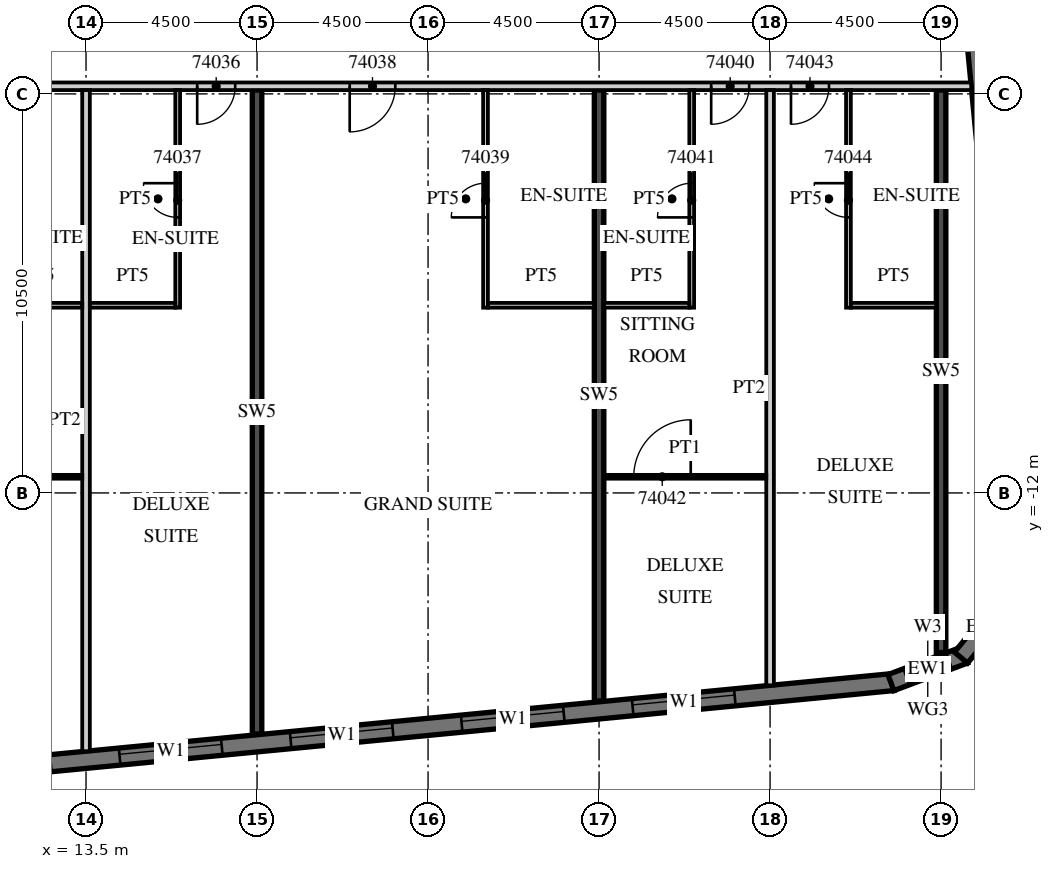
"""IFC4 building model, lengths in metres.
Left out: names, types, materials, properties, quantities, classifications, styles, units other than length and angle.
Written with IfcOpenShell. Run it as: python <this file> out.ifc"""

import sys

from ifc_helpers import new_model, si_unit, direction, frame, frame_2d, origin, place, context, subcontext, project, spatial, polyline, rectangle, outline, extrude, element, fill, save


model = new_model("IFC4")
c1 = context("Model", 3, precision=1e-05, world=origin(), true_north=direction((0.0, 1.0)))
c2 = subcontext(c1, "Body", "Model", "MODEL_VIEW")
j1 = project(units=[si_unit("LENGTHUNIT", "METRE"), si_unit("PLANEANGLEUNIT", "RADIAN")], contexts=[c1])
p1 = place(None, origin())
s1 = spatial("IfcSite", under=j1, at=p1, CompositionType="ELEMENT")
p2 = place(p1, origin())
s2 = spatial("IfcBuilding", under=s1, at=p2, CompositionType="ELEMENT")
p3 = place(p2, frame((0.0, 0.0, 294.9)))
s3 = spatial("IfcBuildingStorey", under=s2, at=p3, CompositionType="ELEMENT", Elevation=294.9)
p4 = place(p3, frame((18.0, -18.341, 0.0), z_axis=(0.0, 0.0, 1.0), x_axis=(0.0, 1.0, 0.0)))
e1 = element("IfcWall", 1, at=p4, inside=s3, PredefinedType="SHEAR", context=c2, shape_type="SweptSolid", body=[
    extrude(rectangle(XDim=16.941, YDim=0.25, at=frame_2d((8.47, 0.0))), origin(), (0.0, 0.0, 1.0), 3.3),
])
p5 = place(p3, frame((27.0, -17.474, 0.0), z_axis=(0.0, 0.0, 1.0), x_axis=(0.0, 1.0, 0.0)))
e2 = element("IfcWall", 2, at=p5, inside=s3, PredefinedType="SHEAR", context=c2, shape_type="SweptSolid", body=[
    extrude(rectangle(XDim=16.074, YDim=0.25, at=frame_2d((8.037, 0.0))), origin(), (0.0, 0.0, 1.0), 3.3),
])
p6 = place(p3, frame((36.0, -16.199, 0.0), z_axis=(0.0, 0.0, 1.0), x_axis=(0.0, 1.0, 0.0)))
e3 = element("IfcWall", 3, at=p6, inside=s3, PredefinedType="SHEAR", context=c2, shape_type="SweptSolid", body=[
    extrude(rectangle(XDim=14.799, YDim=0.25, at=frame_2d((7.399, 0.0))), origin(), (0.0, 0.0, 1.0), 3.3),
])
p7 = place(p3, frame((-13.521, -21.624, 0.0), z_axis=(0.0, 0.0, 1.0), x_axis=(0.995396186218, 0.095845878695, 0.0)))
e4 = element("IfcWall", 4, at=p7, inside=s3, PredefinedType="SOLIDWALL", context=c2, shape_type="SweptSolid", body=[
    extrude(rectangle(XDim=48.481, YDim=0.45, at=frame_2d((24.241, 0.0))), origin(), (0.0, 0.0, 1.0), 3.02),
])
p8 = place(p7, frame((0.91, 0.0, 0.45)))
e5 = element("IfcOpeningElement", 5, at=p8, cuts=e4, PredefinedType="OPENING", context=c2, shape_type="SweptSolid", body=[
    extrude(rectangle(XDim=2.7, YDim=2.25, at=frame_2d((1.35, 1.125))), frame((0.0, 0.235, 0.0), z_axis=(0.0, -1.0, 0.0), x_axis=(1.0, 0.0, 0.0)), (0.0, 0.0, 1.0), 0.47),
])
p9 = place(p7, frame((5.431, 0.0, 0.45)))
e6 = element("IfcOpeningElement", 6, at=p9, cuts=e4, PredefinedType="OPENING", context=c2, shape_type="SweptSolid", body=[
    extrude(rectangle(XDim=2.7, YDim=2.25, at=frame_2d((1.35, 1.125))), frame((0.0, 0.235, 0.0), z_axis=(0.0, -1.0, 0.0), x_axis=(1.0, 0.0, 0.0)), (0.0, 0.0, 1.0), 0.47),
])
p10 = place(p7, frame((9.952, 0.0, 0.45)))
e7 = element("IfcOpeningElement", 7, at=p10, cuts=e4, PredefinedType="OPENING", context=c2, shape_type="SweptSolid", body=[
    extrude(rectangle(XDim=2.7, YDim=2.25, at=frame_2d((1.35, 1.125))), frame((0.0, 0.235, 0.0), z_axis=(0.0, -1.0, 0.0), x_axis=(1.0, 0.0, 0.0)), (0.0, 0.0, 1.0), 0.47),
])
p11 = place(p7, frame((14.473, 0.0, 0.45)))
e8 = element("IfcOpeningElement", 8, at=p11, cuts=e4, PredefinedType="OPENING", context=c2, shape_type="SweptSolid", body=[
    extrude(rectangle(XDim=2.7, YDim=2.25, at=frame_2d((1.35, 1.125))), frame((0.0, 0.235, 0.0), z_axis=(0.0, -1.0, 0.0), x_axis=(1.0, 0.0, 0.0)), (0.0, 0.0, 1.0), 0.47),
])
p12 = place(p7, frame((18.994, 0.0, 0.45)))
e9 = element("IfcOpeningElement", 9, at=p12, cuts=e4, PredefinedType="OPENING", context=c2, shape_type="SweptSolid", body=[
    extrude(rectangle(XDim=2.7, YDim=2.25, at=frame_2d((1.35, 1.125))), frame((0.0, 0.235, 0.0), z_axis=(0.0, -1.0, 0.0), x_axis=(1.0, 0.0, 0.0)), (0.0, 0.0, 1.0), 0.47),
])
p13 = place(p7, frame((23.514, 0.0, 0.45)))
e10 = element("IfcOpeningElement", 10, at=p13, cuts=e4, PredefinedType="OPENING", context=c2, shape_type="SweptSolid", body=[
    extrude(rectangle(XDim=2.7, YDim=2.25, at=frame_2d((1.35, 1.125))), frame((0.0, 0.235, 0.0), z_axis=(0.0, -1.0, 0.0), x_axis=(1.0, 0.0, 0.0)), (0.0, 0.0, 1.0), 0.47),
])
p14 = place(p7, frame((28.035, 0.0, 0.45)))
e11 = element("IfcOpeningElement", 11, at=p14, cuts=e4, PredefinedType="OPENING", context=c2, shape_type="SweptSolid", body=[
    extrude(rectangle(XDim=2.7, YDim=2.25, at=frame_2d((1.35, 1.125))), frame((0.0, 0.235, 0.0), z_axis=(0.0, -1.0, 0.0), x_axis=(1.0, 0.0, 0.0)), (0.0, 0.0, 1.0), 0.47),
])
p15 = place(p7, frame((32.556, 0.0, 0.45)))
e12 = element("IfcOpeningElement", 12, at=p15, cuts=e4, PredefinedType="OPENING", context=c2, shape_type="SweptSolid", body=[
    extrude(rectangle(XDim=2.7, YDim=2.25, at=frame_2d((1.35, 1.125))), frame((0.0, 0.235, 0.0), z_axis=(0.0, -1.0, 0.0), x_axis=(1.0, 0.0, 0.0)), (0.0, 0.0, 1.0), 0.47),
])
p16 = place(p7, frame((37.077, 0.0, 0.45)))
e13 = element("IfcOpeningElement", 13, at=p16, cuts=e4, PredefinedType="OPENING", context=c2, shape_type="SweptSolid", body=[
    extrude(rectangle(XDim=2.7, YDim=2.25, at=frame_2d((1.35, 1.125))), frame((0.0, 0.235, 0.0), z_axis=(0.0, -1.0, 0.0), x_axis=(1.0, 0.0, 0.0)), (0.0, 0.0, 1.0), 0.47),
])
p17 = place(p7, frame((41.598, 0.0, 0.45)))
e14 = element("IfcOpeningElement", 14, at=p17, cuts=e4, PredefinedType="OPENING", context=c2, shape_type="SweptSolid", body=[
    extrude(rectangle(XDim=2.7, YDim=2.25, at=frame_2d((1.35, 1.125))), frame((0.0, 0.235, 0.0), z_axis=(0.0, -1.0, 0.0), x_axis=(1.0, 0.0, 0.0)), (0.0, 0.0, 1.0), 0.47),
])
p18 = place(p3, frame((34.679, -16.99, 0.0), z_axis=(0.0, 0.0, 1.0), x_axis=(0.936677599948, 0.350192909346, 0.0)))
e15 = element("IfcWall", 15, at=p18, inside=s3, PredefinedType="SOLIDWALL", context=c2, shape_type="SweptSolid", body=[
    extrude(outline(polyline([(0.0, -0.225), (2.071, -0.225), (1.95, 0.225), (0.121, 0.225), (0.0, -0.225)])), origin(), (0.0, 0.0, 1.0), 3.02),
])
p19 = place(p18, frame((0.435, 0.0, 0.45)))
e16 = element("IfcOpeningElement", 16, at=p19, cuts=e15, PredefinedType="OPENING", context=c2, shape_type="SweptSolid", body=[
    extrude(rectangle(XDim=1.2, YDim=2.25, at=frame_2d((0.6, 1.125))), frame((0.0, 0.235, 0.0), z_axis=(0.0, -1.0, 0.0), x_axis=(1.0, 0.0, 0.0)), (0.0, 0.0, 1.0), 0.47),
])
p20 = place(p3, frame((36.524, -16.333, 0.0), z_axis=(0.0, 0.0, 1.0), x_axis=(0.636046112757, 0.771651049663, 0.0)))
e17 = element("IfcWall", 17, at=p20, inside=s3, PredefinedType="SOLIDWALL", context=c2, shape_type="SweptSolid", body=[
    extrude(outline(polyline([(0.0, -0.225), (2.071, -0.225), (1.95, 0.225), (0.121, 0.225), (0.0, -0.225)])), origin(), (0.0, 0.0, 1.0), 3.02),
])
p21 = place(p3, frame((38.132, -12.858, 0.0), z_axis=(0.0, 0.0, 1.0), x_axis=(-0.095847749461, 0.995396006082, 0.0)))
e18 = element("IfcWall", 18, at=p21, inside=s3, PredefinedType="SOLIDWALL", context=c2, shape_type="SweptSolid", body=[
    extrude(rectangle(XDim=32.0, YDim=0.45, at=frame_2d((16.0, 0.0))), origin(), (0.0, 0.0, 1.0), 3.02),
])
p22 = place(p3, frame((-13.5, -1.3, 0.0), z_axis=(0.0, 0.0, 1.0), x_axis=(1.0, 0.0, 0.0)))
e19 = element("IfcWall", 19, at=p22, inside=s3, PredefinedType="PARTITIONING", context=c2, shape_type="SweptSolid", body=[
    extrude(rectangle(XDim=50.293, YDim=0.2, at=frame_2d((25.146, 0.0))), origin(), (0.0, 0.0, 1.0), 3.02),
])
p23 = place(p22, frame((2.925, 0.0, 0.0)))
e20 = element("IfcOpeningElement", 20, at=p23, cuts=e19, PredefinedType="OPENING", context=c2, shape_type="SweptSolid", body=[
    extrude(rectangle(XDim=1.0, YDim=2.1, at=frame_2d((0.5, 1.05))), frame((0.0, 0.11, 0.0), z_axis=(0.0, -1.0, 0.0), x_axis=(1.0, 0.0, 0.0)), (0.0, 0.0, 1.0), 0.22),
])
p24 = place(p22, frame((7.45, 0.0, 0.0)))
e21 = element("IfcOpeningElement", 21, at=p24, cuts=e19, PredefinedType="OPENING", context=c2, shape_type="SweptSolid", body=[
    extrude(rectangle(XDim=1.0, YDim=2.1, at=frame_2d((0.5, 1.05))), frame((0.0, 0.11, 0.0), z_axis=(0.0, -1.0, 0.0), x_axis=(1.0, 0.0, 0.0)), (0.0, 0.0, 1.0), 0.22),
])
p25 = place(p22, frame((9.55, 0.0, 0.0)))
e22 = element("IfcOpeningElement", 22, at=p25, cuts=e19, PredefinedType="OPENING", context=c2, shape_type="SweptSolid", body=[
    extrude(rectangle(XDim=1.0, YDim=2.1, at=frame_2d((0.5, 1.05))), frame((0.0, 0.11, 0.0), z_axis=(0.0, -1.0, 0.0), x_axis=(1.0, 0.0, 0.0)), (0.0, 0.0, 1.0), 0.22),
])
p26 = place(p22, frame((18.862, 0.0, 0.0)))
e23 = element("IfcOpeningElement", 23, at=p26, cuts=e19, PredefinedType="OPENING", context=c2, shape_type="SweptSolid", body=[
    extrude(rectangle(XDim=1.2, YDim=2.1, at=frame_2d((0.6, 1.05))), frame((0.0, 0.11, 0.0), z_axis=(0.0, -1.0, 0.0), x_axis=(1.0, 0.0, 0.0)), (0.0, 0.0, 1.0), 0.22),
])
p27 = place(p22, frame((23.075, 0.0, 0.0)))
e24 = element("IfcOpeningElement", 24, at=p27, cuts=e19, PredefinedType="OPENING", context=c2, shape_type="SweptSolid", body=[
    extrude(rectangle(XDim=1.0, YDim=2.1, at=frame_2d((0.5, 1.05))), frame((0.0, 0.11, 0.0), z_axis=(0.0, -1.0, 0.0), x_axis=(1.0, 0.0, 0.0)), (0.0, 0.0, 1.0), 0.22),
])
p28 = place(p22, frame((29.925, 0.0, 0.0)))
e25 = element("IfcOpeningElement", 25, at=p28, cuts=e19, PredefinedType="OPENING", context=c2, shape_type="SweptSolid", body=[
    extrude(rectangle(XDim=1.0, YDim=2.1, at=frame_2d((0.5, 1.05))), frame((0.0, 0.11, 0.0), z_axis=(0.0, -1.0, 0.0), x_axis=(1.0, 0.0, 0.0)), (0.0, 0.0, 1.0), 0.22),
])
p29 = place(p22, frame((33.938, 0.0, 0.0)))
e26 = element("IfcOpeningElement", 26, at=p29, cuts=e19, PredefinedType="OPENING", context=c2, shape_type="SweptSolid", body=[
    extrude(rectangle(XDim=1.2, YDim=2.1, at=frame_2d((0.6, 1.05))), frame((0.0, 0.11, 0.0), z_axis=(0.0, -1.0, 0.0), x_axis=(1.0, 0.0, 0.0)), (0.0, 0.0, 1.0), 0.22),
])
p30 = place(p22, frame((43.45, 0.0, 0.0)))
e27 = element("IfcOpeningElement", 27, at=p30, cuts=e19, PredefinedType="OPENING", context=c2, shape_type="SweptSolid", body=[
    extrude(rectangle(XDim=1.0, YDim=2.1, at=frame_2d((0.5, 1.05))), frame((0.0, 0.11, 0.0), z_axis=(0.0, -1.0, 0.0), x_axis=(1.0, 0.0, 0.0)), (0.0, 0.0, 1.0), 0.22),
])
p31 = place(p22, frame((45.55, 0.0, 0.0)))
e28 = element("IfcOpeningElement", 28, at=p31, cuts=e19, PredefinedType="OPENING", context=c2, shape_type="SweptSolid", body=[
    extrude(rectangle(XDim=1.0, YDim=2.1, at=frame_2d((0.5, 1.05))), frame((0.0, 0.11, 0.0), z_axis=(0.0, -1.0, 0.0), x_axis=(1.0, 0.0, 0.0)), (0.0, 0.0, 1.0), 0.22),
])
p32 = place(p3, frame((13.5, -18.796, 0.0), z_axis=(0.0, 0.0, 1.0), x_axis=(0.0, 1.0, 0.0)))
e29 = element("IfcWall", 29, at=p32, inside=s3, PredefinedType="PARTITIONING", context=c2, shape_type="SweptSolid", body=[
    extrude(rectangle(XDim=17.396, YDim=0.2, at=frame_2d((8.698, 0.0))), origin(), (0.0, 0.0, 1.0), 3.02),
])
p33 = place(p3, frame((11.15, -7.062, 0.0), z_axis=(0.0, 0.0, 1.0), x_axis=(1.0, 0.0, 0.0)))
e30 = element("IfcWall", 30, at=p33, inside=s3, PredefinedType="PARTITIONING", context=c2, shape_type="SweptSolid", body=[
    extrude(rectangle(XDim=2.25, YDim=0.125, at=frame_2d((1.125, 0.0))), origin(), (0.0, 0.0, 1.0), 3.02),
])
p34 = place(p3, frame((9.125, -11.575, 0.0), z_axis=(0.0, 0.0, 1.0), x_axis=(1.0, 0.0, 0.0)))
e31 = element("IfcWall", 31, at=p34, inside=s3, PredefinedType="PARTITIONING", context=c2, shape_type="SweptSolid", body=[
    extrude(rectangle(XDim=4.275, YDim=0.1, at=frame_2d((2.137, 0.0))), origin(), (0.0, 0.0, 1.0), 3.02),
])
p35 = place(p34, frame((0.787, 0.0, 0.0)))
e32 = element("IfcOpeningElement", 32, at=p35, cuts=e31, PredefinedType="OPENING", context=c2, shape_type="SweptSolid", body=[
    extrude(rectangle(XDim=1.5, YDim=2.1, at=frame_2d((0.75, 1.05))), frame((0.0, 0.06, 0.0), z_axis=(0.0, -1.0, 0.0), x_axis=(1.0, 0.0, 0.0)), (0.0, 0.0, 1.0), 0.12),
])
p36 = place(p3, frame((15.912, -7.125, 0.0), z_axis=(0.0, 0.0, 1.0), x_axis=(0.0, 1.0, 0.0)))
e33 = element("IfcWall", 33, at=p36, inside=s3, PredefinedType="PARTITIONING", context=c2, shape_type="SweptSolid", body=[
    extrude(rectangle(XDim=5.725, YDim=0.125, at=frame_2d((2.863, 0.0))), origin(), (0.0, 0.0, 1.0), 3.02),
])
p37 = place(p36, frame((2.375, 0.0, 0.0)))
e34 = element("IfcOpeningElement", 34, at=p37, cuts=e33, PredefinedType="OPENING", context=c2, shape_type="SweptSolid", body=[
    extrude(rectangle(XDim=0.9, YDim=2.1, at=frame_2d((0.45, 1.05))), frame((0.0, 0.073, 0.0), z_axis=(0.0, -1.0, 0.0), x_axis=(1.0, 0.0, 0.0)), (0.0, 0.0, 1.0), 0.145),
])
p38 = place(p3, frame((13.6, -7.062, 0.0), z_axis=(0.0, 0.0, 1.0), x_axis=(1.0, 0.0, 0.0)))
e35 = element("IfcWall", 35, at=p38, inside=s3, PredefinedType="PARTITIONING", context=c2, shape_type="SweptSolid", body=[
    extrude(rectangle(XDim=2.25, YDim=0.125, at=frame_2d((1.125, 0.0))), origin(), (0.0, 0.0, 1.0), 3.02),
])
p39 = place(p3, frame((24.012, -7.125, 0.0), z_axis=(0.0, 0.0, 1.0), x_axis=(0.0, 1.0, 0.0)))
e36 = element("IfcWall", 36, at=p39, inside=s3, PredefinedType="PARTITIONING", context=c2, shape_type="SweptSolid", body=[
    extrude(rectangle(XDim=5.725, YDim=0.125, at=frame_2d((2.863, 0.0))), origin(), (0.0, 0.0, 1.0), 3.02),
])
p40 = place(p39, frame((2.375, 0.0, 0.0)))
e37 = element("IfcOpeningElement", 37, at=p40, cuts=e36, PredefinedType="OPENING", context=c2, shape_type="SweptSolid", body=[
    extrude(rectangle(XDim=0.9, YDim=2.1, at=frame_2d((0.45, 1.05))), frame((0.0, 0.073, 0.0), z_axis=(0.0, -1.0, 0.0), x_axis=(1.0, 0.0, 0.0)), (0.0, 0.0, 1.0), 0.145),
])
p41 = place(p3, frame((24.075, -7.062, 0.0), z_axis=(0.0, 0.0, 1.0), x_axis=(1.0, 0.0, 0.0)))
e38 = element("IfcWall", 38, at=p41, inside=s3, PredefinedType="PARTITIONING", context=c2, shape_type="SweptSolid", body=[
    extrude(rectangle(XDim=2.8, YDim=0.125, at=frame_2d((1.4, 0.0))), origin(), (0.0, 0.0, 1.0), 3.02),
])
p42 = place(p3, frame((31.5, -17.063, 0.0), z_axis=(0.0, 0.0, 1.0), x_axis=(0.0, 1.0, 0.0)))
e39 = element("IfcWall", 39, at=p42, inside=s3, PredefinedType="PARTITIONING", context=c2, shape_type="SweptSolid", body=[
    extrude(rectangle(XDim=15.663, YDim=0.2, at=frame_2d((7.832, 0.0))), origin(), (0.0, 0.0, 1.0), 3.02),
])
p43 = place(p3, frame((29.438, -7.125, 0.0), z_axis=(0.0, 0.0, 1.0), x_axis=(0.0, 1.0, 0.0)))
e40 = element("IfcWall", 40, at=p43, inside=s3, PredefinedType="PARTITIONING", context=c2, shape_type="SweptSolid", body=[
    extrude(rectangle(XDim=5.725, YDim=0.125, at=frame_2d((2.863, 0.0))), origin(), (0.0, 0.0, 1.0), 3.02),
])
p44 = place(p43, frame((2.375, 0.0, 0.0)))
e41 = element("IfcOpeningElement", 41, at=p44, cuts=e40, PredefinedType="OPENING", context=c2, shape_type="SweptSolid", body=[
    extrude(rectangle(XDim=0.9, YDim=2.1, at=frame_2d((0.45, 1.05))), frame((0.0, 0.073, 0.0), z_axis=(0.0, -1.0, 0.0), x_axis=(1.0, 0.0, 0.0)), (0.0, 0.0, 1.0), 0.145),
])
p45 = place(p3, frame((27.125, -7.062, 0.0), z_axis=(0.0, 0.0, 1.0), x_axis=(1.0, 0.0, 0.0)))
e42 = element("IfcWall", 42, at=p45, inside=s3, PredefinedType="PARTITIONING", context=c2, shape_type="SweptSolid", body=[
    extrude(rectangle(XDim=2.25, YDim=0.125, at=frame_2d((1.125, 0.0))), origin(), (0.0, 0.0, 1.0), 3.02),
])
p46 = place(p3, frame((27.125, -11.575, 0.0), z_axis=(0.0, 0.0, 1.0), x_axis=(1.0, 0.0, 0.0)))
e43 = element("IfcWall", 43, at=p46, inside=s3, PredefinedType="PARTITIONING", context=c2, shape_type="SweptSolid", body=[
    extrude(rectangle(XDim=4.275, YDim=0.1, at=frame_2d((2.137, 0.0))), origin(), (0.0, 0.0, 1.0), 3.02),
])
p47 = place(p46, frame((0.787, 0.0, 0.0)))
e44 = element("IfcOpeningElement", 44, at=p47, cuts=e43, PredefinedType="OPENING", context=c2, shape_type="SweptSolid", body=[
    extrude(rectangle(XDim=1.5, YDim=2.1, at=frame_2d((0.75, 1.05))), frame((0.0, 0.06, 0.0), z_axis=(0.0, -1.0, 0.0), x_axis=(1.0, 0.0, 0.0)), (0.0, 0.0, 1.0), 0.12),
])
p48 = place(p3, frame((33.562, -7.125, 0.0), z_axis=(0.0, 0.0, 1.0), x_axis=(0.0, 1.0, 0.0)))
e45 = element("IfcWall", 45, at=p48, inside=s3, PredefinedType="PARTITIONING", context=c2, shape_type="SweptSolid", body=[
    extrude(rectangle(XDim=5.725, YDim=0.125, at=frame_2d((2.863, 0.0))), origin(), (0.0, 0.0, 1.0), 3.02),
])
p49 = place(p48, frame((2.375, 0.0, 0.0)))
e46 = element("IfcOpeningElement", 46, at=p49, cuts=e45, PredefinedType="OPENING", context=c2, shape_type="SweptSolid", body=[
    extrude(rectangle(XDim=0.9, YDim=2.1, at=frame_2d((0.45, 1.05))), frame((0.0, 0.073, 0.0), z_axis=(0.0, -1.0, 0.0), x_axis=(1.0, 0.0, 0.0)), (0.0, 0.0, 1.0), 0.145),
])
p50 = place(p3, frame((33.625, -7.062, 0.0), z_axis=(0.0, 0.0, 1.0), x_axis=(1.0, 0.0, 0.0)))
e47 = element("IfcWall", 47, at=p50, inside=s3, PredefinedType="PARTITIONING", context=c2, shape_type="SweptSolid", body=[
    extrude(rectangle(XDim=2.25, YDim=0.125, at=frame_2d((1.125, 0.0))), origin(), (0.0, 0.0, 1.0), 3.02),
])
p51 = place(p14, origin())
e48 = element("IfcWindow", 48, at=p51, inside=s3, PartitioningType="SINGLE_PANEL", PredefinedType="WINDOW", context=c2, shape_type="SweptSolid", body=[
    extrude(rectangle(XDim=2.7, YDim=2.25, at=frame_2d((1.35, 1.125))), frame((0.0, 0.09, 0.0), z_axis=(0.0, -1.0, 0.0), x_axis=(1.0, 0.0, 0.0)), (0.0, 0.0, 1.0), 0.06),
])
fill(e11, e48)
p52 = place(p15, origin())
e49 = element("IfcWindow", 49, at=p52, inside=s3, PartitioningType="SINGLE_PANEL", PredefinedType="WINDOW", context=c2, shape_type="SweptSolid", body=[
    extrude(rectangle(XDim=2.7, YDim=2.25, at=frame_2d((1.35, 1.125))), frame((0.0, 0.09, 0.0), z_axis=(0.0, -1.0, 0.0), x_axis=(1.0, 0.0, 0.0)), (0.0, 0.0, 1.0), 0.06),
])
fill(e12, e49)
p53 = place(p16, origin())
e50 = element("IfcWindow", 50, at=p53, inside=s3, PartitioningType="SINGLE_PANEL", PredefinedType="WINDOW", context=c2, shape_type="SweptSolid", body=[
    extrude(rectangle(XDim=2.7, YDim=2.25, at=frame_2d((1.35, 1.125))), frame((0.0, 0.09, 0.0), z_axis=(0.0, -1.0, 0.0), x_axis=(1.0, 0.0, 0.0)), (0.0, 0.0, 1.0), 0.06),
])
fill(e13, e50)
p54 = place(p17, origin())
e51 = element("IfcWindow", 51, at=p54, inside=s3, PartitioningType="SINGLE_PANEL", PredefinedType="WINDOW", context=c2, shape_type="SweptSolid", body=[
    extrude(rectangle(XDim=2.7, YDim=2.25, at=frame_2d((1.35, 1.125))), frame((0.0, 0.09, 0.0), z_axis=(0.0, -1.0, 0.0), x_axis=(1.0, 0.0, 0.0)), (0.0, 0.0, 1.0), 0.06),
])
fill(e14, e51)
p55 = place(p19, origin())
e52 = element("IfcWindow", 52, at=p55, inside=s3, PartitioningType="SINGLE_PANEL", PredefinedType="WINDOW", context=c2, shape_type="SweptSolid", body=[
    extrude(rectangle(XDim=1.2, YDim=2.25, at=frame_2d((0.6, 1.125))), frame((0.0, 0.09, 0.0), z_axis=(0.0, -1.0, 0.0), x_axis=(1.0, 0.0, 0.0)), (0.0, 0.0, 1.0), 0.06),
])
fill(e16, e52)
p56 = place(p28, origin())
e53 = element("IfcDoor", 53, at=p56, inside=s3, OperationType="SINGLE_SWING_LEFT", PredefinedType="DOOR", context=c2, shape_type="SweptSolid", body=[
    extrude(rectangle(XDim=1.0, YDim=2.1, at=frame_2d((0.5, 1.05))), frame((0.0, 0.025, 0.0), z_axis=(0.0, -1.0, 0.0), x_axis=(1.0, 0.0, 0.0)), (0.0, 0.0, 1.0), 0.05),
])
fill(e25, e53)
p57 = place(p37, origin())
e54 = element("IfcDoor", 54, at=p57, inside=s3, OperationType="SINGLE_SWING_RIGHT", PredefinedType="DOOR", context=c2, shape_type="SweptSolid", body=[
    extrude(rectangle(XDim=0.9, YDim=2.1, at=frame_2d((0.45, 1.05))), frame((0.0, 0.025, 0.0), z_axis=(0.0, -1.0, 0.0), x_axis=(1.0, 0.0, 0.0)), (0.0, 0.0, 1.0), 0.05),
])
fill(e34, e54)
p58 = place(p29, origin())
e55 = element("IfcDoor", 55, at=p58, inside=s3, OperationType="SINGLE_SWING_LEFT", PredefinedType="DOOR", context=c2, shape_type="SweptSolid", body=[
    extrude(rectangle(XDim=1.2, YDim=2.1, at=frame_2d((0.6, 1.05))), frame((0.0, 0.025, 0.0), z_axis=(0.0, -1.0, 0.0), x_axis=(1.0, 0.0, 0.0)), (0.0, 0.0, 1.0), 0.05),
])
fill(e26, e55)
p59 = place(p40, origin())
e56 = element("IfcDoor", 56, at=p59, inside=s3, OperationType="SINGLE_SWING_LEFT", PredefinedType="DOOR", context=c2, shape_type="SweptSolid", body=[
    extrude(rectangle(XDim=0.9, YDim=2.1, at=frame_2d((0.45, 1.05))), frame((0.0, 0.025, 0.0), z_axis=(0.0, -1.0, 0.0), x_axis=(1.0, 0.0, 0.0)), (0.0, 0.0, 1.0), 0.05),
])
fill(e37, e56)
p60 = place(p30, origin())
e57 = element("IfcDoor", 57, at=p60, inside=s3, OperationType="SINGLE_SWING_LEFT", PredefinedType="DOOR", context=c2, shape_type="SweptSolid", body=[
    extrude(rectangle(XDim=1.0, YDim=2.1, at=frame_2d((0.5, 1.05))), frame((0.0, 0.025, 0.0), z_axis=(0.0, -1.0, 0.0), x_axis=(1.0, 0.0, 0.0)), (0.0, 0.0, 1.0), 0.05),
])
fill(e27, e57)
p61 = place(p44, origin())
e58 = element("IfcDoor", 58, at=p61, inside=s3, OperationType="SINGLE_SWING_LEFT", PredefinedType="DOOR", context=c2, shape_type="SweptSolid", body=[
    extrude(rectangle(XDim=0.9, YDim=2.1, at=frame_2d((0.45, 1.05))), frame((0.0, 0.025, 0.0), z_axis=(0.0, -1.0, 0.0), x_axis=(1.0, 0.0, 0.0)), (0.0, 0.0, 1.0), 0.05),
])
fill(e41, e58)
p62 = place(p47, origin())
e59 = element("IfcDoor", 59, at=p62, inside=s3, OperationType="SINGLE_SWING_RIGHT", PredefinedType="DOOR", context=c2, shape_type="SweptSolid", body=[
    extrude(rectangle(XDim=1.5, YDim=2.1, at=frame_2d((0.75, 1.05))), frame((0.0, 0.025, 0.0), z_axis=(0.0, -1.0, 0.0), x_axis=(1.0, 0.0, 0.0)), (0.0, 0.0, 1.0), 0.05),
])
fill(e44, e59)
p63 = place(p31, origin())
e60 = element("IfcDoor", 60, at=p63, inside=s3, OperationType="SINGLE_SWING_LEFT", PredefinedType="DOOR", context=c2, shape_type="SweptSolid", body=[
    extrude(rectangle(XDim=1.0, YDim=2.1, at=frame_2d((0.5, 1.05))), frame((0.0, 0.025, 0.0), z_axis=(0.0, -1.0, 0.0), x_axis=(1.0, 0.0, 0.0)), (0.0, 0.0, 1.0), 0.05),
])
fill(e28, e60)
p64 = place(p49, origin())
e61 = element("IfcDoor", 61, at=p64, inside=s3, OperationType="SINGLE_SWING_RIGHT", PredefinedType="DOOR", context=c2, shape_type="SweptSolid", body=[
    extrude(rectangle(XDim=0.9, YDim=2.1, at=frame_2d((0.45, 1.05))), frame((0.0, 0.025, 0.0), z_axis=(0.0, -1.0, 0.0), x_axis=(1.0, 0.0, 0.0)), (0.0, 0.0, 1.0), 0.05),
])
fill(e46, e61)
save(model, sys.argv[1])
